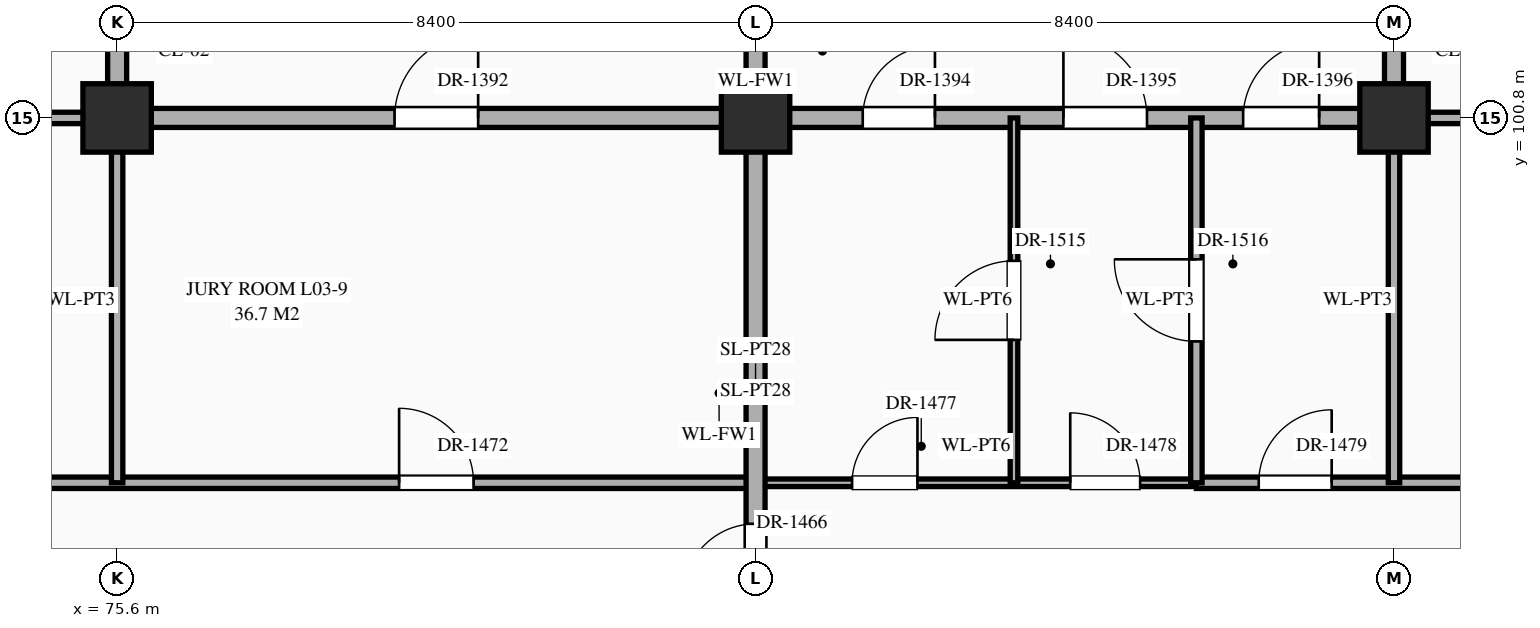
"""IFC4 building model, lengths in metres.
Left out: names, types, materials, properties, quantities, classifications, styles, units other than length and angle.
Written with IfcOpenShell. Run it as: python <this file> out.ifc"""

import sys

from ifc_helpers import new_model, si_unit, direction, frame, frame_2d, origin, origin_2d, place, context, subcontext, project, spatial, rectangle, extrude, element, fill, save


model = new_model("IFC4")
c1 = context("Model", 3, precision=1e-05, world=origin(), true_north=direction((0.0, 1.0)))
c2 = subcontext(c1, "Body", "Model", "MODEL_VIEW")
j1 = project(units=[si_unit("LENGTHUNIT", "METRE"), si_unit("PLANEANGLEUNIT", "RADIAN")], contexts=[c1])
p1 = place(None, origin())
s1 = spatial("IfcSite", under=j1, at=p1, CompositionType="ELEMENT")
p2 = place(p1, origin())
s2 = spatial("IfcBuilding", under=s1, at=p2, CompositionType="ELEMENT")
p3 = place(p2, frame((0.0, 0.0, 10.8)))
s3 = spatial("IfcBuildingStorey", under=s2, at=p3, CompositionType="ELEMENT", Elevation=10.8)
for number, where, z_axis, x_axis in (
    (1, (75.6, 100.8, 0.0), (0.0, 0.0, 1.0), (1.0, 0.0, 0.0)),
    (2, (84.0, 100.8, 0.0), (0.0, 0.0, 1.0), (1.0, 0.0, 0.0)),
    (3, (92.4, 100.8, 0.0), (0.0, 0.0, 1.0), (1.0, 0.0, 0.0)),
):
    element("IfcColumn", number, at=place(p3, frame(where, z_axis=z_axis, x_axis=x_axis)), inside=s3, PredefinedType="COLUMN", context=c2, shape_type="SweptSolid", body=[
        extrude(rectangle(XDim=0.9, YDim=0.9, at=origin_2d()), origin(), (0.0, 0.0, 1.0), 5.4),
    ])
p4 = place(p3, frame((56.2, 96.0, 0.0), z_axis=(0.0, 0.0, 1.0), x_axis=(1.0, 0.0, 0.0)))
e4 = element("IfcWall", 4, at=p4, inside=s3, PredefinedType="STANDARD", context=c2, shape_type="SweptSolid", body=[
    extrude(rectangle(XDim=27.8, YDim=0.15, at=frame_2d((13.9, 0.0))), origin(), (0.0, 0.0, 1.0), 5.12),
])
p5 = place(p4, frame((0.68, 0.0, 0.0)))
e5 = element("IfcOpeningElement", 5, at=p5, cuts=e4, PredefinedType="OPENING", context=c2, shape_type="SweptSolid", body=[
    extrude(rectangle(XDim=1.24, YDim=2.3, at=frame_2d((0.62, 1.15))), frame((0.0, 0.087, 0.0), z_axis=(0.0, -1.0, 0.0), x_axis=(1.0, 0.0, 0.0)), (0.0, 0.0, 1.0), 0.174),
])
p6 = place(p4, frame((6.16, 0.0, 0.0)))
e6 = element("IfcOpeningElement", 6, at=p6, cuts=e4, PredefinedType="OPENING", context=c2, shape_type="SweptSolid", body=[
    extrude(rectangle(XDim=1.28, YDim=2.35, at=frame_2d((0.64, 1.175))), frame((0.0, 0.087, 0.0), z_axis=(0.0, -1.0, 0.0), x_axis=(1.0, 0.0, 0.0)), (0.0, 0.0, 1.0), 0.174),
])
p7 = place(p4, frame((14.73, 0.0, 0.0)))
e7 = element("IfcOpeningElement", 7, at=p7, cuts=e4, PredefinedType="OPENING", context=c2, shape_type="SweptSolid", body=[
    extrude(rectangle(XDim=0.94, YDim=2.3, at=frame_2d((0.47, 1.15))), frame((0.0, 0.087, 0.0), z_axis=(0.0, -1.0, 0.0), x_axis=(1.0, 0.0, 0.0)), (0.0, 0.0, 1.0), 0.174),
])
p8 = place(p4, frame((23.11, 0.0, 0.0)))
e8 = element("IfcOpeningElement", 8, at=p8, cuts=e4, PredefinedType="OPENING", context=c2, shape_type="SweptSolid", body=[
    extrude(rectangle(XDim=0.98, YDim=2.35, at=frame_2d((0.49, 1.175))), frame((0.0, 0.087, 0.0), z_axis=(0.0, -1.0, 0.0), x_axis=(1.0, 0.0, 0.0)), (0.0, 0.0, 1.0), 0.174),
])
p9 = place(p3, frame((84.0, 96.0, 0.0), z_axis=(0.0, 0.0, 1.0), x_axis=(1.0, 0.0, 0.0)))
e9 = element("IfcWall", 9, at=p9, inside=s3, PredefinedType="STANDARD", context=c2, shape_type="SweptSolid", body=[
    extrude(rectangle(XDim=5.8, YDim=0.1, at=frame_2d((2.9, 0.0))), origin(), (0.0, 0.0, 1.0), 5.12),
])
p10 = place(p9, frame((1.27, 0.0, 0.0)))
e10 = element("IfcOpeningElement", 10, at=p10, cuts=e9, PredefinedType="OPENING", context=c2, shape_type="SweptSolid", body=[
    extrude(rectangle(XDim=0.86, YDim=2.1, at=frame_2d((0.43, 1.05))), frame((0.0, 0.062, 0.0), z_axis=(0.0, -1.0, 0.0), x_axis=(1.0, 0.0, 0.0)), (0.0, 0.0, 1.0), 0.124),
])
p11 = place(p9, frame((4.14, 0.0, 0.0)))
e11 = element("IfcOpeningElement", 11, at=p11, cuts=e9, PredefinedType="OPENING", context=c2, shape_type="SweptSolid", body=[
    extrude(rectangle(XDim=0.92, YDim=2.15, at=frame_2d((0.46, 1.075))), frame((0.0, 0.062, 0.0), z_axis=(0.0, -1.0, 0.0), x_axis=(1.0, 0.0, 0.0)), (0.0, 0.0, 1.0), 0.124),
])
p12 = place(p3, frame((89.8, 96.0, 0.0), z_axis=(0.0, 0.0, 1.0), x_axis=(1.0, 0.0, 0.0)))
e12 = element("IfcWall", 12, at=p12, inside=s3, PredefinedType="STANDARD", context=c2, shape_type="SweptSolid", body=[
    extrude(rectangle(XDim=19.4, YDim=0.15, at=frame_2d((9.7, 0.0))), origin(), (0.0, 0.0, 1.0), 5.12),
])
p13 = place(p12, frame((0.82, 0.0, 0.0)))
e13 = element("IfcOpeningElement", 13, at=p13, cuts=e12, PredefinedType="OPENING", context=c2, shape_type="SweptSolid", body=[
    extrude(rectangle(XDim=0.96, YDim=2.2, at=frame_2d((0.48, 1.1))), frame((0.0, 0.087, 0.0), z_axis=(0.0, -1.0, 0.0), x_axis=(1.0, 0.0, 0.0)), (0.0, 0.0, 1.0), 0.174),
])
p14 = place(p12, frame((6.3, 0.0, 0.0)))
e14 = element("IfcOpeningElement", 14, at=p14, cuts=e12, PredefinedType="OPENING", context=c2, shape_type="SweptSolid", body=[
    extrude(rectangle(XDim=1.0, YDim=2.25, at=frame_2d((0.5, 1.125))), frame((0.0, 0.087, 0.0), z_axis=(0.0, -1.0, 0.0), x_axis=(1.0, 0.0, 0.0)), (0.0, 0.0, 1.0), 0.174),
])
p15 = place(p12, frame((14.68, 0.0, 0.0)))
e15 = element("IfcOpeningElement", 15, at=p15, cuts=e12, PredefinedType="OPENING", context=c2, shape_type="SweptSolid", body=[
    extrude(rectangle(XDim=1.04, YDim=2.2, at=frame_2d((0.52, 1.1))), frame((0.0, 0.087, 0.0), z_axis=(0.0, -1.0, 0.0), x_axis=(1.0, 0.0, 0.0)), (0.0, 0.0, 1.0), 0.174),
])
p16 = place(p3, frame((71.4, 100.8, 0.0), z_axis=(0.0, 0.0, 1.0), x_axis=(1.0, 0.0, 0.0)))
e16 = element("IfcWall", 16, at=p16, inside=s3, PredefinedType="STANDARD", context=c2, shape_type="SweptSolid", body=[
    extrude(rectangle(XDim=4.2, YDim=0.15, at=frame_2d((2.1, 0.0))), origin(), (0.0, 0.0, 1.0), 4.27),
])
p17 = place(p16, frame((1.465, 0.0, 0.0)))
e17 = element("IfcOpeningElement", 17, at=p17, cuts=e16, PredefinedType="OPENING", context=c2, shape_type="SweptSolid", body=[
    extrude(rectangle(XDim=0.9, YDim=2.15, at=frame_2d((0.45, 1.075))), frame((0.0, 0.087, 0.0), z_axis=(0.0, -1.0, 0.0), x_axis=(1.0, 0.0, 0.0)), (0.0, 0.0, 1.0), 0.174),
])
p18 = place(p3, frame((75.6, 100.8, 0.0), z_axis=(0.0, 0.0, 1.0), x_axis=(1.0, 0.0, 0.0)))
e18 = element("IfcWall", 18, at=p18, inside=s3, PredefinedType="STANDARD", context=c2, shape_type="SweptSolid", body=[
    extrude(rectangle(XDim=16.8, YDim=0.25, at=frame_2d((8.4, 0.0))), origin(), (0.0, 0.0, 1.0), 4.27),
])
p19 = place(p18, frame((3.65, 0.0, 0.0)))
e19 = element("IfcOpeningElement", 19, at=p19, cuts=e18, PredefinedType="OPENING", context=c2, shape_type="SweptSolid", body=[
    extrude(rectangle(XDim=1.1, YDim=2.2, at=frame_2d((0.55, 1.1))), frame((0.0, 0.137, 0.0), z_axis=(0.0, -1.0, 0.0), x_axis=(1.0, 0.0, 0.0)), (0.0, 0.0, 1.0), 0.274),
])
p20 = place(p18, frame((9.81, 0.0, 0.0)))
e20 = element("IfcOpeningElement", 20, at=p20, cuts=e18, PredefinedType="OPENING", context=c2, shape_type="SweptSolid", body=[
    extrude(rectangle(XDim=0.95, YDim=2.15, at=frame_2d((0.475, 1.075))), frame((0.0, 0.137, 0.0), z_axis=(0.0, -1.0, 0.0), x_axis=(1.0, 0.0, 0.0)), (0.0, 0.0, 1.0), 0.274),
])
p21 = place(p18, frame((12.45, 0.0, 0.0)))
e21 = element("IfcOpeningElement", 21, at=p21, cuts=e18, PredefinedType="OPENING", context=c2, shape_type="SweptSolid", body=[
    extrude(rectangle(XDim=1.1, YDim=2.2, at=frame_2d((0.55, 1.1))), frame((0.0, 0.137, 0.0), z_axis=(0.0, -1.0, 0.0), x_axis=(1.0, 0.0, 0.0)), (0.0, 0.0, 1.0), 0.274),
])
p22 = place(p18, frame((14.815, 0.0, 0.0)))
e22 = element("IfcOpeningElement", 22, at=p22, cuts=e18, PredefinedType="OPENING", context=c2, shape_type="SweptSolid", body=[
    extrude(rectangle(XDim=1.0, YDim=2.2, at=frame_2d((0.5, 1.1))), frame((0.0, 0.137, 0.0), z_axis=(0.0, -1.0, 0.0), x_axis=(1.0, 0.0, 0.0)), (0.0, 0.0, 1.0), 0.274),
])
p23 = place(p3, frame((92.4, 100.8, 0.0), z_axis=(0.0, 0.0, 1.0), x_axis=(1.0, 0.0, 0.0)))
e23 = element("IfcWall", 23, at=p23, inside=s3, PredefinedType="STANDARD", context=c2, shape_type="SweptSolid", body=[
    extrude(rectangle(XDim=4.2, YDim=0.15, at=frame_2d((2.1, 0.0))), origin(), (0.0, 0.0, 1.0), 4.27),
])
p24 = place(p23, frame((1.765, 0.0, 0.0)))
e24 = element("IfcOpeningElement", 24, at=p24, cuts=e23, PredefinedType="OPENING", context=c2, shape_type="SweptSolid", body=[
    extrude(rectangle(XDim=1.04, YDim=2.2, at=frame_2d((0.52, 1.1))), frame((0.0, 0.087, 0.0), z_axis=(0.0, -1.0, 0.0), x_axis=(1.0, 0.0, 0.0)), (0.0, 0.0, 1.0), 0.174),
])
p25 = place(p3, frame((75.6, 96.0, 0.0), z_axis=(0.0, 0.0, 1.0), x_axis=(0.0, 1.0, 0.0)))
e25 = element("IfcWall", 25, at=p25, inside=s3, PredefinedType="STANDARD", context=c2, shape_type="SweptSolid", body=[
    extrude(rectangle(XDim=4.8, YDim=0.15, at=frame_2d((2.4, 0.0))), origin(), (0.0, 0.0, 1.0), 4.37),
])
p26 = place(p3, frame((75.6, 100.8, 0.0), z_axis=(0.0, 0.0, 1.0), x_axis=(0.0, 1.0, 0.0)))
e26 = element("IfcWall", 26, at=p26, inside=s3, PredefinedType="STANDARD", context=c2, shape_type="SweptSolid", body=[
    extrude(rectangle(XDim=3.6, YDim=0.25, at=frame_2d((1.8, 0.0))), origin(), (0.0, 0.0, 1.0), 4.37),
])
p27 = place(p26, frame((0.91, 0.0, 0.0)))
e27 = element("IfcOpeningElement", 27, at=p27, cuts=e26, PredefinedType="OPENING", context=c2, shape_type="SweptSolid", body=[
    extrude(rectangle(XDim=0.95, YDim=2.15, at=frame_2d((0.475, 1.075))), frame((0.0, 0.137, 0.0), z_axis=(0.0, -1.0, 0.0), x_axis=(1.0, 0.0, 0.0)), (0.0, 0.0, 1.0), 0.274),
])
p28 = place(p3, frame((84.0, 79.2, 0.0), z_axis=(0.0, 0.0, 1.0), x_axis=(0.0, 1.0, 0.0)))
e28 = element("IfcWall", 28, at=p28, inside=s3, PredefinedType="STANDARD", context=c2, shape_type="SweptSolid", body=[
    extrude(rectangle(XDim=35.96, YDim=0.25, at=frame_2d((17.98, 0.0))), origin(), (0.0, 0.0, 1.0), 4.37),
])
p29 = place(p28, frame((22.835, 0.0, 0.0)))
e29 = element("IfcOpeningElement", 29, at=p29, cuts=e28, PredefinedType="OPENING", context=c2, shape_type="SweptSolid", body=[
    extrude(rectangle(XDim=1.5, YDim=2.25, at=frame_2d((0.75, 1.125))), frame((0.0, 0.137, 0.0), z_axis=(0.0, -1.0, 0.0), x_axis=(1.0, 0.0, 0.0)), (0.0, 0.0, 1.0), 0.274),
])
p30 = place(p28, frame((12.465, 0.0, 0.0)))
e30 = element("IfcOpeningElement", 30, at=p30, cuts=e28, PredefinedType="OPENING", context=c2, shape_type="SweptSolid", body=[
    extrude(rectangle(XDim=1.1, YDim=2.2, at=frame_2d((0.55, 1.1))), frame((0.0, 0.137, 0.0), z_axis=(0.0, -1.0, 0.0), x_axis=(1.0, 0.0, 0.0)), (0.0, 0.0, 1.0), 0.274),
])
p31 = place(p28, frame((15.31, 0.0, 0.0)))
e31 = element("IfcOpeningElement", 31, at=p31, cuts=e28, PredefinedType="OPENING", context=c2, shape_type="SweptSolid", body=[
    extrude(rectangle(XDim=0.95, YDim=2.15, at=frame_2d((0.475, 1.075))), frame((0.0, 0.137, 0.0), z_axis=(0.0, -1.0, 0.0), x_axis=(1.0, 0.0, 0.0)), (0.0, 0.0, 1.0), 0.274),
])
p32 = place(p28, frame((25.915, 0.0, 0.0)))
e32 = element("IfcOpeningElement", 32, at=p32, cuts=e28, PredefinedType="OPENING", context=c2, shape_type="SweptSolid", body=[
    extrude(rectangle(XDim=1.8, YDim=2.35, at=frame_2d((0.9, 1.175))), frame((0.0, 0.137, 0.0), z_axis=(0.0, -1.0, 0.0), x_axis=(1.0, 0.0, 0.0)), (0.0, 0.0, 1.0), 0.274),
])
p33 = place(p28, frame((29.71, 0.0, 0.0)))
e33 = element("IfcOpeningElement", 33, at=p33, cuts=e28, PredefinedType="OPENING", context=c2, shape_type="SweptSolid", body=[
    extrude(rectangle(XDim=0.95, YDim=2.15, at=frame_2d((0.475, 1.075))), frame((0.0, 0.137, 0.0), z_axis=(0.0, -1.0, 0.0), x_axis=(1.0, 0.0, 0.0)), (0.0, 0.0, 1.0), 0.274),
])
p34 = place(p28, frame((5.265, 0.0, 0.0)))
e34 = element("IfcOpeningElement", 34, at=p34, cuts=e28, PredefinedType="OPENING", context=c2, shape_type="SweptSolid", body=[
    extrude(rectangle(XDim=1.1, YDim=2.2, at=frame_2d((0.55, 1.1))), frame((0.0, 0.137, 0.0), z_axis=(0.0, -1.0, 0.0), x_axis=(1.0, 0.0, 0.0)), (0.0, 0.0, 1.0), 0.274),
])
p35 = place(p3, frame((87.4, 96.0, 0.0), z_axis=(0.0, 0.0, 1.0), x_axis=(0.0, 1.0, 0.0)))
e35 = element("IfcWall", 35, at=p35, inside=s3, PredefinedType="STANDARD", context=c2, shape_type="SweptSolid", body=[
    extrude(rectangle(XDim=4.8, YDim=0.1, at=frame_2d((2.4, 0.0))), origin(), (0.0, 0.0, 1.0), 5.12),
])
p36 = place(p35, frame((1.88, 0.0, 0.0)))
e36 = element("IfcOpeningElement", 36, at=p36, cuts=e35, PredefinedType="OPENING", context=c2, shape_type="SweptSolid", body=[
    extrude(rectangle(XDim=1.04, YDim=2.2, at=frame_2d((0.52, 1.1))), frame((0.0, 0.062, 0.0), z_axis=(0.0, -1.0, 0.0), x_axis=(1.0, 0.0, 0.0)), (0.0, 0.0, 1.0), 0.124),
])
p37 = place(p3, frame((89.8, 96.0, 0.0), z_axis=(0.0, 0.0, 1.0), x_axis=(0.0, 1.0, 0.0)))
e37 = element("IfcWall", 37, at=p37, inside=s3, PredefinedType="STANDARD", context=c2, shape_type="SweptSolid", body=[
    extrude(rectangle(XDim=4.8, YDim=0.15, at=frame_2d((2.4, 0.0))), origin(), (0.0, 0.0, 1.0), 5.12),
])
p38 = place(p37, frame((1.86, 0.0, 0.0)))
e38 = element("IfcOpeningElement", 38, at=p38, cuts=e37, PredefinedType="OPENING", context=c2, shape_type="SweptSolid", body=[
    extrude(rectangle(XDim=1.08, YDim=2.25, at=frame_2d((0.54, 1.125))), frame((0.0, 0.087, 0.0), z_axis=(0.0, -1.0, 0.0), x_axis=(1.0, 0.0, 0.0)), (0.0, 0.0, 1.0), 0.174),
])
p39 = place(p3, frame((92.4, 96.0, 0.0), z_axis=(0.0, 0.0, 1.0), x_axis=(0.0, 1.0, 0.0)))
e39 = element("IfcWall", 39, at=p39, inside=s3, PredefinedType="STANDARD", context=c2, shape_type="SweptSolid", body=[
    extrude(rectangle(XDim=4.8, YDim=0.15, at=frame_2d((2.4, 0.0))), origin(), (0.0, 0.0, 1.0), 4.37),
])
p40 = place(p3, frame((92.4, 100.8, 0.0), z_axis=(0.0, 0.0, 1.0), x_axis=(0.0, 1.0, 0.0)))
e40 = element("IfcWall", 40, at=p40, inside=s3, PredefinedType="STANDARD", context=c2, shape_type="SweptSolid", body=[
    extrude(rectangle(XDim=3.6, YDim=0.25, at=frame_2d((1.8, 0.0))), origin(), (0.0, 0.0, 1.0), 4.37),
])
p41 = place(p40, frame((0.885, 0.0, 0.0)))
e41 = element("IfcOpeningElement", 41, at=p41, cuts=e40, PredefinedType="OPENING", context=c2, shape_type="SweptSolid", body=[
    extrude(rectangle(XDim=1.0, YDim=2.2, at=frame_2d((0.5, 1.1))), frame((0.0, 0.137, 0.0), z_axis=(0.0, -1.0, 0.0), x_axis=(1.0, 0.0, 0.0)), (0.0, 0.0, 1.0), 0.274),
])
p42 = place(p19, origin())
e42 = element("IfcDoor", 42, at=p42, inside=s3, OperationType="SINGLE_SWING_RIGHT", PredefinedType="DOOR", context=c2, shape_type="SweptSolid", body=[
    extrude(rectangle(XDim=1.1, YDim=2.2, at=frame_2d((0.55, 1.1))), frame((0.0, 0.025, 0.0), z_axis=(0.0, -1.0, 0.0), x_axis=(1.0, 0.0, 0.0)), (0.0, 0.0, 1.0), 0.05),
])
fill(e19, e42)
p43 = place(p20, origin())
e43 = element("IfcDoor", 43, at=p43, inside=s3, OperationType="SINGLE_SWING_RIGHT", PredefinedType="DOOR", context=c2, shape_type="SweptSolid", body=[
    extrude(rectangle(XDim=0.95, YDim=2.15, at=frame_2d((0.475, 1.075))), frame((0.0, 0.025, 0.0), z_axis=(0.0, -1.0, 0.0), x_axis=(1.0, 0.0, 0.0)), (0.0, 0.0, 1.0), 0.05),
])
fill(e20, e43)
p44 = place(p21, origin())
e44 = element("IfcDoor", 44, at=p44, inside=s3, OperationType="SINGLE_SWING_LEFT", PredefinedType="DOOR", context=c2, shape_type="SweptSolid", body=[
    extrude(rectangle(XDim=1.1, YDim=2.2, at=frame_2d((0.55, 1.1))), frame((0.0, 0.025, 0.0), z_axis=(0.0, -1.0, 0.0), x_axis=(1.0, 0.0, 0.0)), (0.0, 0.0, 1.0), 0.05),
])
fill(e21, e44)
p45 = place(p22, origin())
e45 = element("IfcDoor", 45, at=p45, inside=s3, OperationType="SINGLE_SWING_RIGHT", PredefinedType="DOOR", context=c2, shape_type="SweptSolid", body=[
    extrude(rectangle(XDim=1.0, YDim=2.2, at=frame_2d((0.5, 1.1))), frame((0.0, 0.025, 0.0), z_axis=(0.0, -1.0, 0.0), x_axis=(1.0, 0.0, 0.0)), (0.0, 0.0, 1.0), 0.05),
])
fill(e22, e45)
p46 = place(p31, origin())
e46 = element("IfcDoor", 46, at=p46, inside=s3, OperationType="SINGLE_SWING_LEFT", PredefinedType="DOOR", context=c2, shape_type="SweptSolid", body=[
    extrude(rectangle(XDim=0.95, YDim=2.15, at=frame_2d((0.475, 1.075))), frame((0.0, 0.025, 0.0), z_axis=(0.0, -1.0, 0.0), x_axis=(1.0, 0.0, 0.0)), (0.0, 0.0, 1.0), 0.05),
])
fill(e31, e46)
p47 = place(p8, origin())
e47 = element("IfcDoor", 47, at=p47, inside=s3, OperationType="SINGLE_SWING_LEFT", PredefinedType="DOOR", context=c2, shape_type="SweptSolid", body=[
    extrude(rectangle(XDim=0.98, YDim=2.35, at=frame_2d((0.49, 1.175))), frame((0.0, 0.025, 0.0), z_axis=(0.0, -1.0, 0.0), x_axis=(1.0, 0.0, 0.0)), (0.0, 0.0, 1.0), 0.05),
])
fill(e8, e47)
p48 = place(p10, origin())
e48 = element("IfcDoor", 48, at=p48, inside=s3, OperationType="SINGLE_SWING_RIGHT", PredefinedType="DOOR", context=c2, shape_type="SweptSolid", body=[
    extrude(rectangle(XDim=0.86, YDim=2.1, at=frame_2d((0.43, 1.05))), frame((0.0, 0.025, 0.0), z_axis=(0.0, -1.0, 0.0), x_axis=(1.0, 0.0, 0.0)), (0.0, 0.0, 1.0), 0.05),
])
fill(e10, e48)
p49 = place(p11, origin())
e49 = element("IfcDoor", 49, at=p49, inside=s3, OperationType="SINGLE_SWING_LEFT", PredefinedType="DOOR", context=c2, shape_type="SweptSolid", body=[
    extrude(rectangle(XDim=0.92, YDim=2.15, at=frame_2d((0.46, 1.075))), frame((0.0, 0.025, 0.0), z_axis=(0.0, -1.0, 0.0), x_axis=(1.0, 0.0, 0.0)), (0.0, 0.0, 1.0), 0.05),
])
fill(e11, e49)
p50 = place(p13, origin())
e50 = element("IfcDoor", 50, at=p50, inside=s3, OperationType="SINGLE_SWING_RIGHT", PredefinedType="DOOR", context=c2, shape_type="SweptSolid", body=[
    extrude(rectangle(XDim=0.96, YDim=2.2, at=frame_2d((0.48, 1.1))), frame((0.0, 0.025, 0.0), z_axis=(0.0, -1.0, 0.0), x_axis=(1.0, 0.0, 0.0)), (0.0, 0.0, 1.0), 0.05),
])
fill(e13, e50)
p51 = place(p36, origin())
e51 = element("IfcDoor", 51, at=p51, inside=s3, OperationType="SINGLE_SWING_LEFT", PredefinedType="DOOR", context=c2, shape_type="SweptSolid", body=[
    extrude(rectangle(XDim=1.04, YDim=2.2, at=frame_2d((0.52, 1.1))), frame((0.0, 0.025, 0.0), z_axis=(0.0, -1.0, 0.0), x_axis=(1.0, 0.0, 0.0)), (0.0, 0.0, 1.0), 0.05),
])
fill(e36, e51)
p52 = place(p38, origin())
e52 = element("IfcDoor", 52, at=p52, inside=s3, OperationType="SINGLE_SWING_RIGHT", PredefinedType="DOOR", context=c2, shape_type="SweptSolid", body=[
    extrude(rectangle(XDim=1.08, YDim=2.25, at=frame_2d((0.54, 1.125))), frame((0.0, 0.025, 0.0), z_axis=(0.0, -1.0, 0.0), x_axis=(1.0, 0.0, 0.0)), (0.0, 0.0, 1.0), 0.05),
])
fill(e38, e52)
save(model, sys.argv[1])
